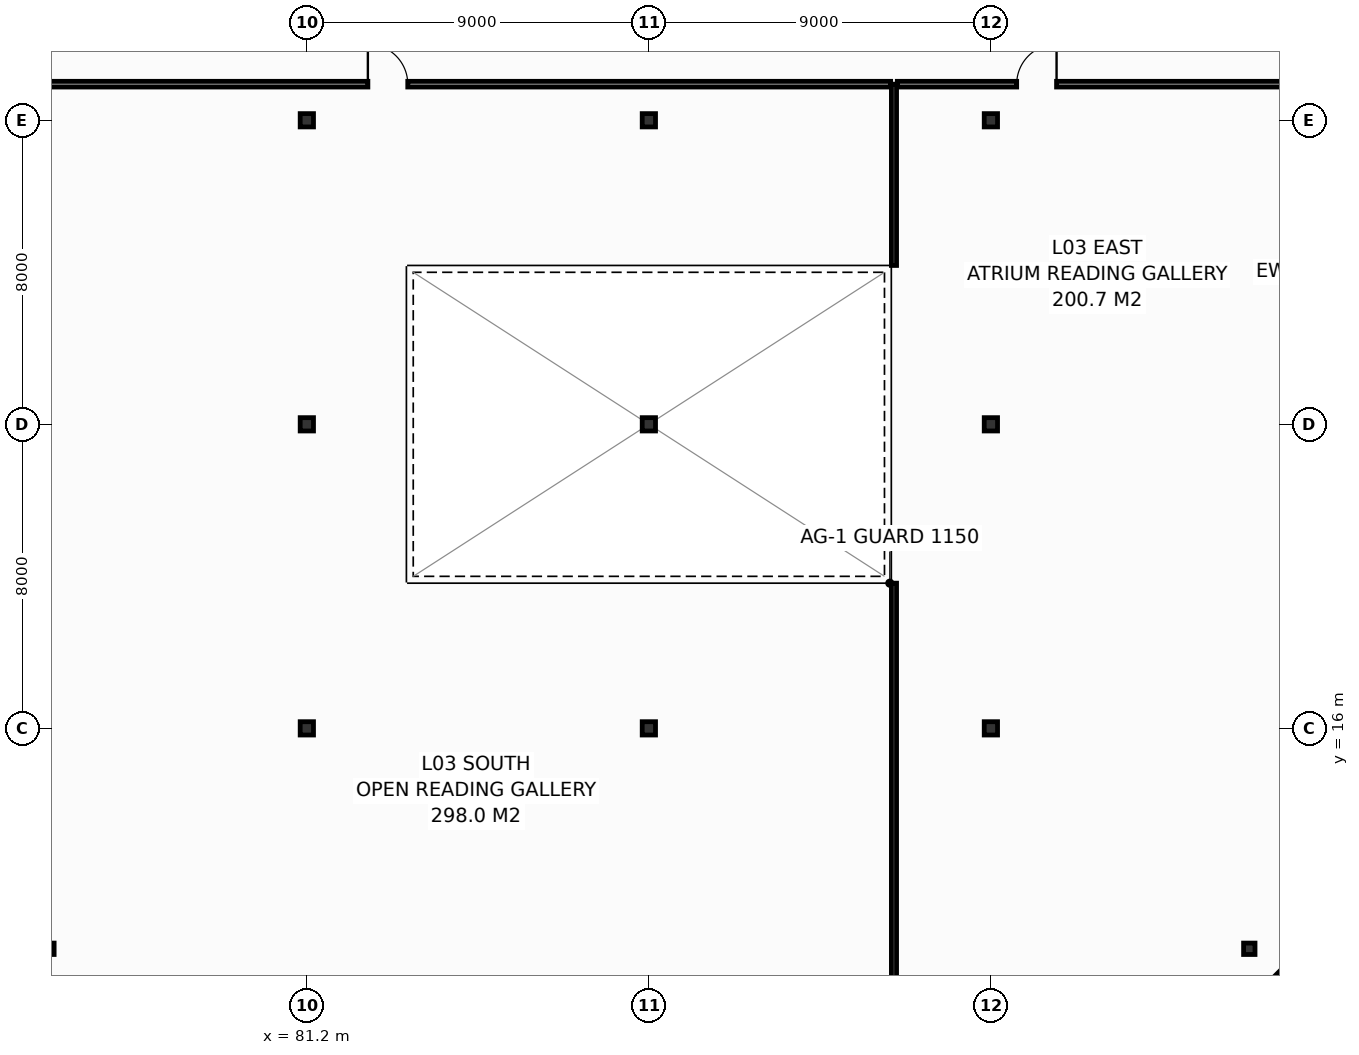
"""IFC4 building model, lengths in metres.
Left out: names, types, materials, properties, quantities, classifications, styles, units other than length and angle.
Written with IfcOpenShell. Run it as: python <this file> out.ifc"""

import sys

from ifc_helpers import new_model, si_unit, direction, frame, frame_2d, origin, origin_2d, place, context, subcontext, project, spatial, rectangle, i_section, extrude, element, fill, save


model = new_model("IFC4")
c1 = context("Model", 3, precision=1e-05, world=origin(), true_north=direction((0.0, 1.0)))
c2 = subcontext(c1, "Body", "Model", "MODEL_VIEW")
j1 = project(units=[si_unit("LENGTHUNIT", "METRE"), si_unit("PLANEANGLEUNIT", "RADIAN")], contexts=[c1])
p1 = place(None, origin())
s1 = spatial("IfcSite", under=j1, at=p1, CompositionType="ELEMENT")
p2 = place(p1, origin())
s2 = spatial("IfcBuilding", under=s1, at=p2, CompositionType="ELEMENT")
p3 = place(p2, frame((0.0, 0.0, 16.8)))
s3 = spatial("IfcBuildingStorey", under=s2, at=p3, CompositionType="ELEMENT", Elevation=16.8)
p4 = place(p3, frame((74.4, 10.2, 0.0), z_axis=(0.0, 0.0, 1.0), x_axis=(1.0, 0.0, 0.0)))
e1 = element("IfcColumn", 1, at=p4, inside=s3, PredefinedType="COLUMN", context=c2, shape_type="SweptSolid", body=[
    extrude(i_section(OverallWidth=0.3, OverallDepth=0.3, WebThickness=0.01, FlangeThickness=0.015, FilletRadius=0.018, at=origin_2d()), origin(), (0.0, 0.0, 1.0), 5.4),
])
for number, where, z_axis, x_axis in (
    (2, (81.2, 16.0, 0.0), (0.0, 0.0, 1.0), (1.0, 0.0, 0.0)),
    (3, (81.2, 24.0, 0.0), (0.0, 0.0, 1.0), (1.0, 0.0, 0.0)),
    (4, (81.2, 32.0, 0.0), (0.0, 0.0, 1.0), (1.0, 0.0, 0.0)),
    (5, (90.2, 16.0, 0.0), (0.0, 0.0, 1.0), (1.0, 0.0, 0.0)),
    (6, (90.2, 24.0, 0.0), (0.0, 0.0, 1.0), (1.0, 0.0, 0.0)),
    (7, (90.2, 32.0, 0.0), (0.0, 0.0, 1.0), (1.0, 0.0, 0.0)),
    (8, (99.2, 16.0, 0.0), (0.0, 0.0, 1.0), (1.0, 0.0, 0.0)),
    (9, (99.2, 24.0, 0.0), (0.0, 0.0, 1.0), (1.0, 0.0, 0.0)),
    (10, (99.2, 32.0, 0.0), (0.0, 0.0, 1.0), (1.0, 0.0, 0.0)),
):
    element("IfcColumn", number, at=place(p3, frame(where, z_axis=z_axis, x_axis=x_axis)), inside=s3, PredefinedType="COLUMN", context=c2, shape_type="SweptSolid", body=[
        extrude(i_section(OverallWidth=0.35, OverallDepth=0.35, WebThickness=0.012, FlangeThickness=0.019, FilletRadius=0.02, at=origin_2d()), origin(), (0.0, 0.0, 1.0), 5.4),
    ])
p5 = place(p3, frame((106.0, 10.2, 0.0), z_axis=(0.0, 0.0, 1.0), x_axis=(1.0, 0.0, 0.0)))
e11 = element("IfcColumn", 11, at=p5, inside=s3, PredefinedType="COLUMN", context=c2, shape_type="SweptSolid", body=[
    extrude(i_section(OverallWidth=0.3, OverallDepth=0.3, WebThickness=0.01, FlangeThickness=0.015, FilletRadius=0.018, at=origin_2d()), origin(), (0.0, 0.0, 1.0), 5.4),
])
p6 = place(p3, frame((72.313, 10.687, 0.0), z_axis=(0.0, 0.0, 1.0), x_axis=(0.707106781187, -0.707106781187, 0.0)))
e12 = element("IfcWall", 12, at=p6, inside=s3, PredefinedType="STANDARD", context=c2, shape_type="SweptSolid", body=[
    extrude(rectangle(XDim=3.64, YDim=0.3, at=frame_2d((1.82, 0.0))), origin(), (0.0, 0.0, 1.0), 5.1),
])
p7 = place(p3, frame((105.513, 8.113, 0.0), z_axis=(0.0, 0.0, 1.0), x_axis=(0.707073244381, 0.707140316402, 0.0)))
e13 = element("IfcWall", 13, at=p7, inside=s3, PredefinedType="STANDARD", context=c2, shape_type="SweptSolid", body=[
    extrude(rectangle(XDim=3.64, YDim=0.3, at=frame_2d((1.82, 0.0))), origin(), (0.0, 0.0, 1.0), 5.1),
])
p8 = place(p3, frame((96.65, 8.17, 0.0), z_axis=(0.0, 0.0, 1.0), x_axis=(0.0, 1.0, 0.0)))
e14 = element("IfcWall", 14, at=p8, inside=s3, PredefinedType="PARTITIONING", context=c2, shape_type="SweptSolid", body=[
    extrude(rectangle(XDim=11.65, YDim=0.135, at=frame_2d((5.825, 0.0))), origin(), (0.0, 0.0, 1.0), 4.385),
])
p9 = place(p3, frame((96.65, 28.18, 0.0), z_axis=(0.0, 0.0, 1.0), x_axis=(0.0, 1.0, 0.0)))
e15 = element("IfcWall", 15, at=p9, inside=s3, PredefinedType="PARTITIONING", context=c2, shape_type="SweptSolid", body=[
    extrude(rectangle(XDim=4.77, YDim=0.135, at=frame_2d((2.385, 0.0))), origin(), (0.0, 0.0, 1.0), 4.385),
])
p10 = place(p3, frame((72.3, 32.95, 0.0), z_axis=(0.0, 0.0, 1.0), x_axis=(1.0, 0.0, 0.0)))
e16 = element("IfcWall", 16, at=p10, inside=s3, PredefinedType="PARTITIONING", context=c2, shape_type="SweptSolid", body=[
    extrude(rectangle(XDim=24.262, YDim=0.15, at=frame_2d((12.131, 0.0))), origin(), (0.0, 0.0, 1.0), 4.385),
])
p11 = place(p10, frame((10.506, 0.0, 0.0)))
e17 = element("IfcOpeningElement", 17, at=p11, cuts=e16, PredefinedType="OPENING", context=c2, shape_type="SweptSolid", body=[
    extrude(rectangle(XDim=1.05, YDim=2.15, at=frame_2d((0.525, 1.075))), frame((0.0, 0.085, 0.0), z_axis=(0.0, -1.0, 0.0), x_axis=(1.0, 0.0, 0.0)), (0.0, 0.0, 1.0), 0.17),
])
p12 = place(p3, frame((96.738, 32.95, 0.0), z_axis=(0.0, 0.0, 1.0), x_axis=(1.0, 0.0, 0.0)))
e18 = element("IfcWall", 18, at=p12, inside=s3, PredefinedType="PARTITIONING", context=c2, shape_type="SweptSolid", body=[
    extrude(rectangle(XDim=11.292, YDim=0.15, at=frame_2d((5.646, 0.0))), origin(), (0.0, 0.0, 1.0), 4.385),
])
p13 = place(p12, frame((3.141, 0.0, 0.0)))
e19 = element("IfcOpeningElement", 19, at=p13, cuts=e18, PredefinedType="OPENING", context=c2, shape_type="SweptSolid", body=[
    extrude(rectangle(XDim=1.05, YDim=2.15, at=frame_2d((0.525, 1.075))), frame((0.0, 0.085, 0.0), z_axis=(0.0, -1.0, 0.0), x_axis=(1.0, 0.0, 0.0)), (0.0, 0.0, 1.0), 0.17),
])
p14 = place(p11, origin())
e20 = element("IfcDoor", 20, at=p14, inside=s3, OperationType="SINGLE_SWING_LEFT", PredefinedType="DOOR", context=c2, shape_type="SweptSolid", body=[
    extrude(rectangle(XDim=1.05, YDim=2.15, at=frame_2d((0.525, 1.075))), frame((0.0, 0.025, 0.0), z_axis=(0.0, -1.0, 0.0), x_axis=(1.0, 0.0, 0.0)), (0.0, 0.0, 1.0), 0.05),
])
fill(e17, e20)
p15 = place(p13, origin())
e21 = element("IfcDoor", 21, at=p15, inside=s3, OperationType="SINGLE_SWING_RIGHT", PredefinedType="DOOR", context=c2, shape_type="SweptSolid", body=[
    extrude(rectangle(XDim=1.05, YDim=2.15, at=frame_2d((0.525, 1.075))), frame((0.0, 0.025, 0.0), z_axis=(0.0, -1.0, 0.0), x_axis=(1.0, 0.0, 0.0)), (0.0, 0.0, 1.0), 0.05),
])
fill(e19, e21)
save(model, sys.argv[1])
